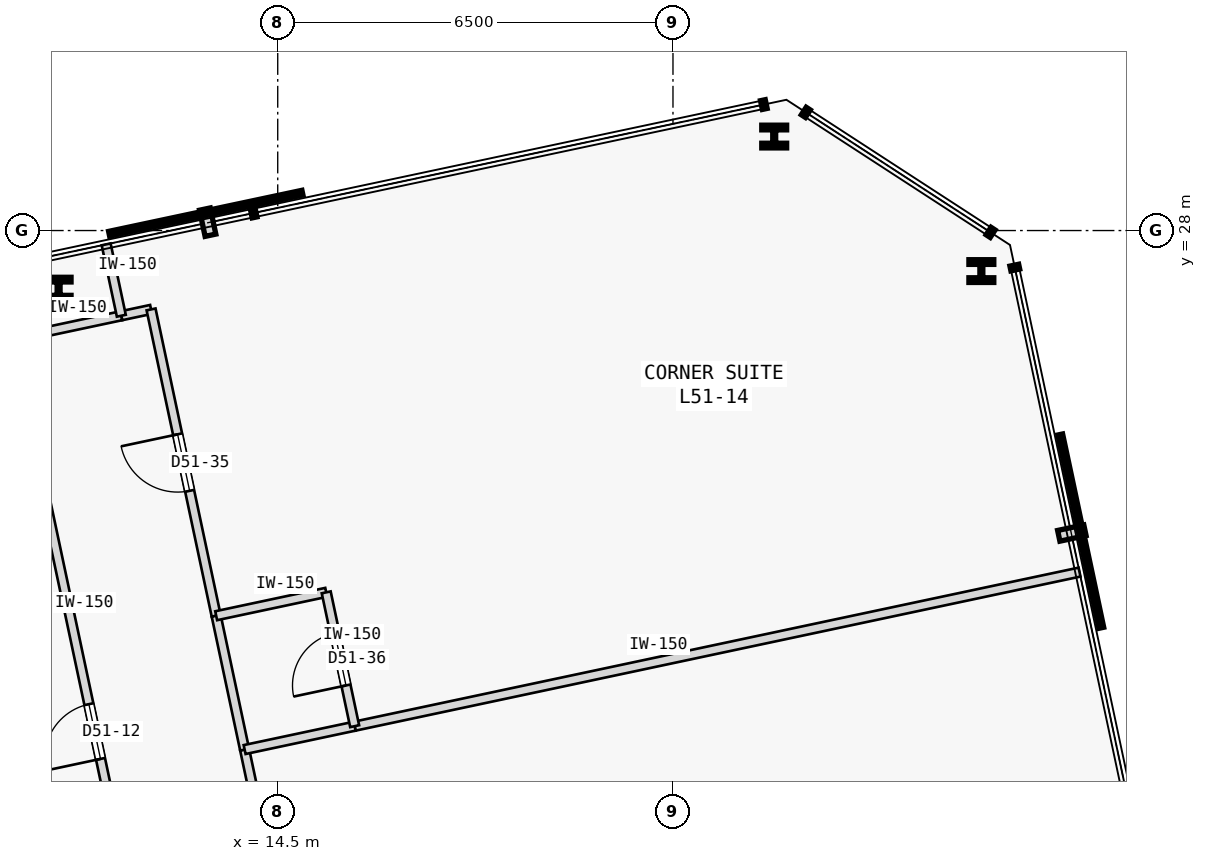
"""IFC4 building model, lengths in metres.
Left out: names, types, materials, properties, quantities, classifications, styles, units other than length and angle.
Written with IfcOpenShell. Run it as: python <this file> out.ifc"""

import sys

from ifc_helpers import new_model, si_unit, direction, frame, frame_2d, origin, origin_2d, place, context, subcontext, project, spatial, rectangle, i_section, extrude, element, fill, save


model = new_model("IFC4")
c1 = context("Model", 3, precision=1e-05, world=origin(), true_north=direction((0.0, 1.0)))
c2 = subcontext(c1, "Body", "Model", "MODEL_VIEW")
j1 = project(units=[si_unit("LENGTHUNIT", "METRE"), si_unit("PLANEANGLEUNIT", "RADIAN")], contexts=[c1])
p1 = place(None, origin())
s1 = spatial("IfcSite", under=j1, at=p1, CompositionType="ELEMENT")
p2 = place(p1, origin())
s2 = spatial("IfcBuilding", under=s1, at=p2, CompositionType="ELEMENT")
p3 = place(p2, frame((0.0, 0.0, 195.6)))
s3 = spatial("IfcBuildingStorey", under=s2, at=p3, CompositionType="ELEMENT", Elevation=195.6)
for number, where, z_axis, x_axis in (
    (1, (26.071, 27.333, 0.0), (0.0, 0.0, 1.0), (1.0, 0.0, 0.0)),
    (2, (22.665, 29.546, 0.0), (0.0, 0.0, 1.0), (1.0, 0.0, 0.0)),
    (3, (10.896, 27.044, 0.0), (0.0, 0.0, 1.0), (1.0, 0.0, 0.0)),
):
    element("IfcColumn", number, at=place(p3, frame(where, z_axis=z_axis, x_axis=x_axis)), inside=s3, PredefinedType="COLUMN", context=c2, shape_type="SweptSolid", body=[
        extrude(i_section(OverallWidth=0.409, OverallDepth=0.374, WebThickness=0.048, FlangeThickness=0.077, FilletRadius=0.015, at=origin_2d()), origin(), (0.0, 0.0, 1.0), 3.4),
    ])
p4 = place(p3, frame((12.862, 13.308, 0.0), z_axis=(0.0, 0.0, 1.0), x_axis=(-0.207911421929, 0.978147657888, 0.0)))
e4 = element("IfcWall", 4, at=p4, inside=s3, PredefinedType="PARTITIONING", context=c2, shape_type="SweptSolid", body=[
    extrude(rectangle(XDim=13.195, YDim=0.15, at=frame_2d((6.598, 0.0))), origin(), (0.0, 0.0, 1.0), 3.175),
])
p5 = place(p4, frame((6.137, 0.0, 0.0)))
e5 = element("IfcOpeningElement", 5, at=p5, cuts=e4, PredefinedType="OPENING", context=c2, shape_type="SweptSolid", body=[
    extrude(rectangle(XDim=0.92, YDim=2.15, at=frame_2d((0.46, 1.075))), frame((0.0, 0.085, 0.0), z_axis=(0.0, -1.0, 0.0), x_axis=(1.0, 0.0, 0.0)), (0.0, 0.0, 1.0), 0.17),
])
p6 = place(p3, frame((10.118, 26.214, 0.0), z_axis=(0.0, 0.0, 1.0), x_axis=(0.978133353907, 0.20797870558, 0.0)))
e6 = element("IfcWall", 6, at=p6, inside=s3, PredefinedType="PARTITIONING", context=c2, shape_type="SweptSolid", body=[
    extrude(rectangle(XDim=1.85, YDim=0.15, at=frame_2d((0.925, 0.0))), origin(), (0.0, 0.0, 1.0), 3.175),
])
p7 = place(p3, frame((15.276, 13.253, 0.0), z_axis=(0.0, 0.0, 1.0), x_axis=(-0.207924511115, 0.978144875608, 0.0)))
e7 = element("IfcWall", 7, at=p7, inside=s3, PredefinedType="PARTITIONING", context=c2, shape_type="SweptSolid", body=[
    extrude(rectangle(XDim=6.35, YDim=0.15, at=frame_2d((3.175, 0.0))), origin(), (0.0, 0.0, 1.0), 3.175),
])
p8 = place(p7, frame((2.7, 0.0, 0.0)))
e8 = element("IfcOpeningElement", 8, at=p8, cuts=e7, PredefinedType="OPENING", context=c2, shape_type="SweptSolid", body=[
    extrude(rectangle(XDim=0.95, YDim=2.15, at=frame_2d((0.475, 1.075))), frame((0.0, 0.085, 0.0), z_axis=(0.0, -1.0, 0.0), x_axis=(1.0, 0.0, 0.0)), (0.0, 0.0, 1.0), 0.17),
])
p9 = place(p3, frame((11.928, 26.599, 0.0), z_axis=(0.0, 0.0, 1.0), x_axis=(0.97822210712, 0.207560856478, 0.0)))
e9 = element("IfcWall", 9, at=p9, inside=s3, PredefinedType="PARTITIONING", context=c2, shape_type="SweptSolid", body=[
    extrude(rectangle(XDim=0.5, YDim=0.15, at=frame_2d((0.25, 0.0))), origin(), (0.0, 0.0, 1.0), 3.175),
])
p10 = place(p3, frame((13.488, 21.666, 0.0), z_axis=(0.0, 0.0, 1.0), x_axis=(-0.207926226209, 0.978144511028, 0.0)))
e10 = element("IfcWall", 10, at=p10, inside=s3, PredefinedType="PARTITIONING", context=c2, shape_type="SweptSolid", body=[
    extrude(rectangle(XDim=5.15, YDim=0.15, at=frame_2d((2.575, 0.0))), origin(), (0.0, 0.0, 1.0), 3.175),
])
p11 = place(p10, frame((2.1, 0.0, 0.0)))
e11 = element("IfcOpeningElement", 11, at=p11, cuts=e10, PredefinedType="OPENING", context=c2, shape_type="SweptSolid", body=[
    extrude(rectangle(XDim=0.95, YDim=2.15, at=frame_2d((0.475, 1.075))), frame((0.0, 0.085, 0.0), z_axis=(0.0, -1.0, 0.0), x_axis=(1.0, 0.0, 0.0)), (0.0, 0.0, 1.0), 0.17),
])
p12 = place(p3, frame((13.956, 19.465, 0.0), z_axis=(0.0, 0.0, 1.0), x_axis=(-0.207891197838, 0.978151956427, 0.0)))
e12 = element("IfcWall", 12, at=p12, inside=s3, PredefinedType="PARTITIONING", context=c2, shape_type="SweptSolid", body=[
    extrude(rectangle(XDim=2.25, YDim=0.15, at=frame_2d((1.125, 0.0))), origin(), (0.0, 0.0, 1.0), 3.175),
])
p13 = place(p3, frame((11.928, 26.599, 0.0), z_axis=(0.0, 0.0, 1.0), x_axis=(-0.20795853359, 0.978137642823, 0.0)))
e13 = element("IfcWall", 13, at=p13, inside=s3, PredefinedType="PARTITIONING", context=c2, shape_type="SweptSolid", body=[
    extrude(rectangle(XDim=1.2, YDim=0.15, at=frame_2d((0.6, 0.0))), origin(), (0.0, 0.0, 1.0), 3.175),
])
p14 = place(p3, frame((15.765, 19.849, 0.0), z_axis=(0.0, 0.0, 1.0), x_axis=(0.978149634612, 0.207902121941, 0.0)))
e14 = element("IfcWall", 14, at=p14, inside=s3, PredefinedType="PARTITIONING", context=c2, shape_type="SweptSolid", body=[
    extrude(rectangle(XDim=12.187, YDim=0.15, at=frame_2d((6.094, 0.0))), origin(), (0.0, 0.0, 1.0), 3.175),
])
for number, where, z_axis, x_axis in (
    (15, (13.956, 19.465, 0.0), (0.0, 0.0, 1.0), (0.978, 0.208, 0.0)),
    (16, (13.488, 21.666, 0.0), (0.0, 0.0, 1.0), (0.978, 0.208, 0.0)),
):
    element("IfcWall", number, at=place(p3, frame(where, z_axis=z_axis, x_axis=x_axis)), inside=s3, PredefinedType="PARTITIONING", context=c2, shape_type="SweptSolid", body=[
        extrude(rectangle(XDim=1.85, YDim=0.15, at=frame_2d((0.925, 0.0))), origin(), (0.0, 0.0, 1.0), 3.175),
    ])
p15 = place(p3, frame((15.765, 19.849, 0.0), z_axis=(0.0, 0.0, 1.0), x_axis=(-0.207891197838, 0.978151956427, 0.0)))
e17 = element("IfcWall", 17, at=p15, inside=s3, PredefinedType="PARTITIONING", context=c2, shape_type="SweptSolid", body=[
    extrude(rectangle(XDim=2.25, YDim=0.15, at=frame_2d((1.125, 0.0))), origin(), (0.0, 0.0, 1.0), 3.175),
])
p16 = place(p15, frame((0.685, 0.0, 0.0)))
e18 = element("IfcOpeningElement", 18, at=p16, cuts=e17, PredefinedType="OPENING", context=c2, shape_type="SweptSolid", body=[
    extrude(rectangle(XDim=0.88, YDim=2.15, at=frame_2d((0.44, 1.075))), frame((0.0, 0.085, 0.0), z_axis=(0.0, -1.0, 0.0), x_axis=(1.0, 0.0, 0.0)), (0.0, 0.0, 1.0), 0.17),
])
p17 = place(p5, origin())
e19 = element("IfcDoor", 19, at=p17, inside=s3, OperationType="SINGLE_SWING_LEFT", PredefinedType="DOOR", context=c2, shape_type="SweptSolid", body=[
    extrude(rectangle(XDim=0.92, YDim=2.15, at=frame_2d((0.46, 1.075))), frame((0.0, 0.025, 0.0), z_axis=(0.0, -1.0, 0.0), x_axis=(1.0, 0.0, 0.0)), (0.0, 0.0, 1.0), 0.05),
])
fill(e5, e19)
p18 = place(p11, origin())
e20 = element("IfcDoor", 20, at=p18, inside=s3, OperationType="SINGLE_SWING_RIGHT", PredefinedType="DOOR", context=c2, shape_type="SweptSolid", body=[
    extrude(rectangle(XDim=0.95, YDim=2.15, at=frame_2d((0.475, 1.075))), frame((0.0, 0.025, 0.0), z_axis=(0.0, -1.0, 0.0), x_axis=(1.0, 0.0, 0.0)), (0.0, 0.0, 1.0), 0.05),
])
fill(e11, e20)
p19 = place(p16, origin())
e21 = element("IfcDoor", 21, at=p19, inside=s3, OperationType="SINGLE_SWING_LEFT", PredefinedType="DOOR", context=c2, shape_type="SweptSolid", body=[
    extrude(rectangle(XDim=0.88, YDim=2.15, at=frame_2d((0.44, 1.075))), frame((0.0, 0.025, 0.0), z_axis=(0.0, -1.0, 0.0), x_axis=(1.0, 0.0, 0.0)), (0.0, 0.0, 1.0), 0.05),
])
fill(e18, e21)
save(model, sys.argv[1])
